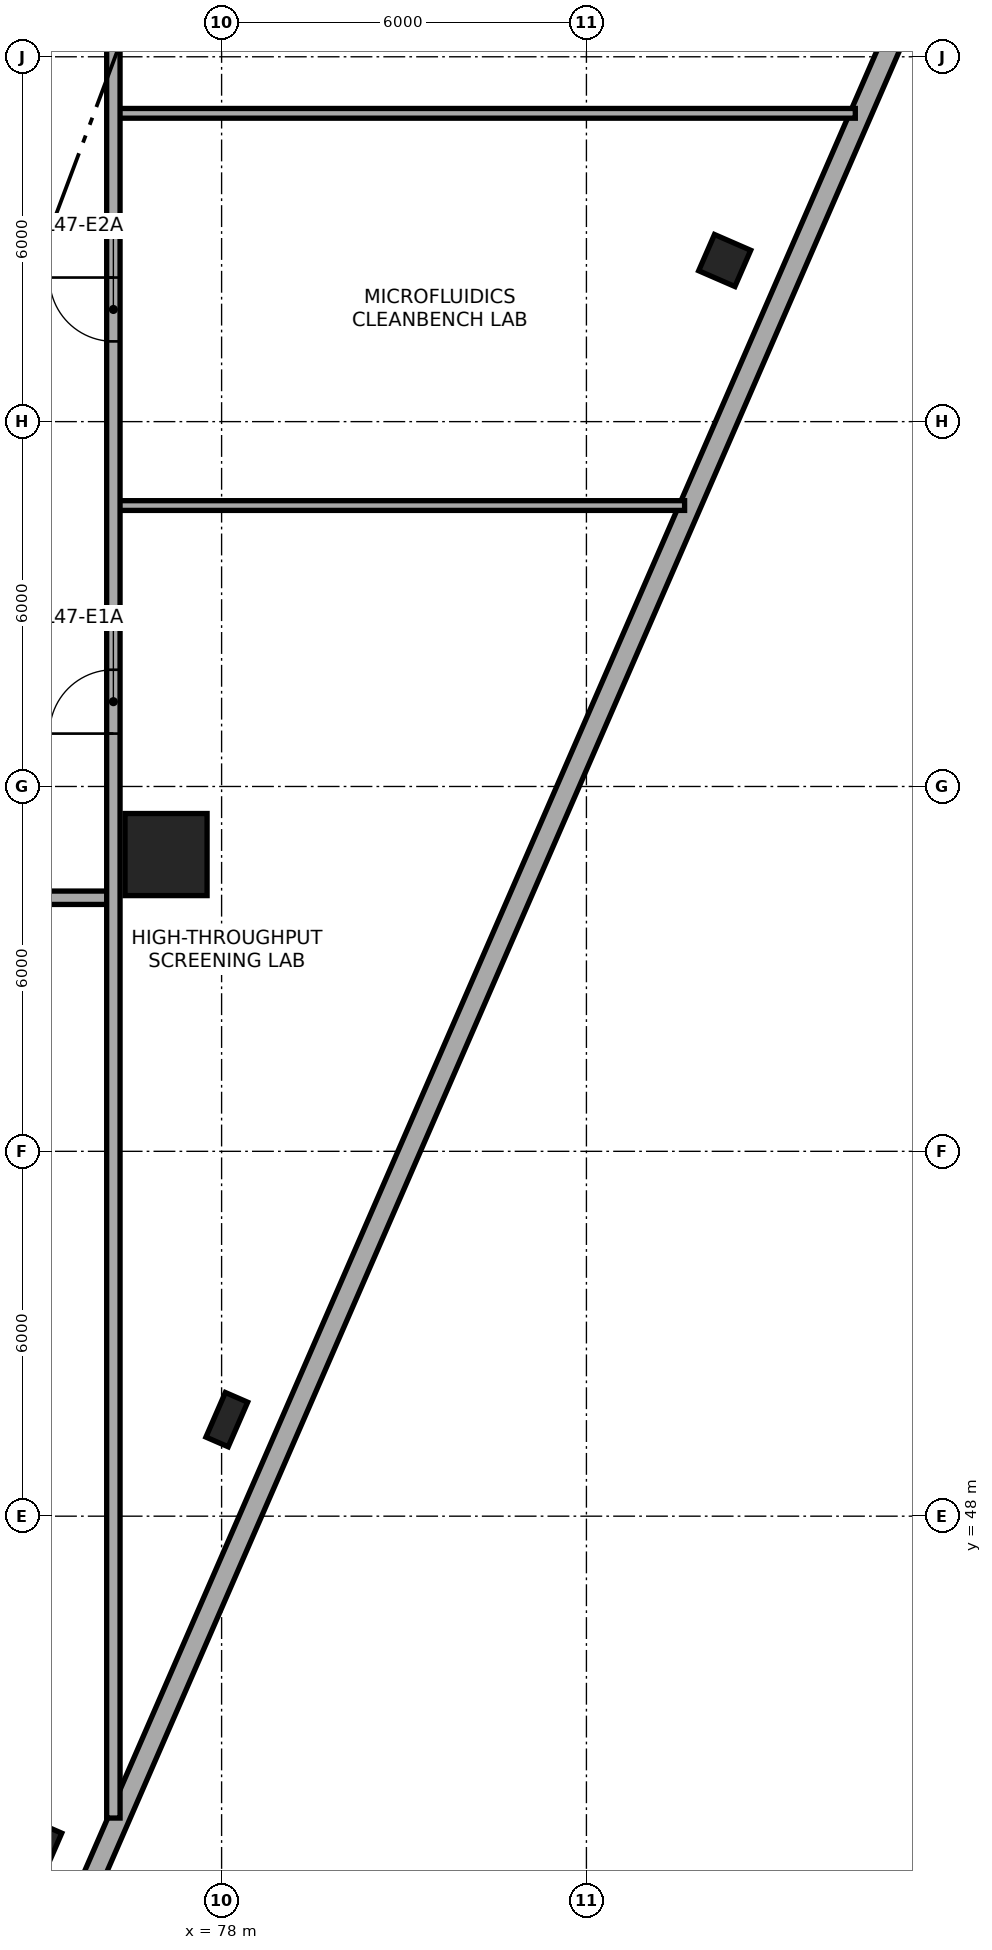
"""IFC4 building model, lengths in metres.
Left out: names, types, materials, properties, quantities, classifications, styles, units other than length and angle.
Written with IfcOpenShell. Run it as: python <this file> out.ifc"""

import sys

from ifc_helpers import new_model, si_unit, direction, frame, frame_2d, origin, origin_2d, place, context, subcontext, project, spatial, rectangle, extrude, element, fill, save


model = new_model("IFC4")
c1 = context("Model", 3, precision=1e-05, world=origin(), true_north=direction((0.0, 1.0)))
c2 = subcontext(c1, "Body", "Model", "MODEL_VIEW")
j1 = project(units=[si_unit("LENGTHUNIT", "METRE"), si_unit("PLANEANGLEUNIT", "RADIAN")], contexts=[c1])
p1 = place(None, origin())
s1 = spatial("IfcSite", under=j1, at=p1, CompositionType="ELEMENT")
p2 = place(p1, origin())
s2 = spatial("IfcBuilding", under=s1, at=p2, CompositionType="ELEMENT")
p3 = place(p2, frame((0.0, 0.0, 179.4)))
s3 = spatial("IfcBuildingStorey", under=s2, at=p3, CompositionType="ELEMENT", Elevation=179.4)
p4 = place(p3, frame((77.086, 58.88, 0.0), z_axis=(0.0, 0.0, 1.0), x_axis=(1.0, 0.0, 0.0)))
e1 = element("IfcColumn", 1, at=p4, inside=s3, PredefinedType="COLUMN", context=c2, shape_type="SweptSolid", body=[
    extrude(rectangle(XDim=1.35, YDim=1.35, at=origin_2d()), origin(), (0.0, 0.0, 1.0), 3.65),
])
p5 = place(p3, frame((74.966, 42.52, 0.003), z_axis=(-0.012442023592, 0.054450576364, 0.998438946948), x_axis=(-0.18521058033, -0.981363560291, 0.051211360722)))
e2 = element("IfcColumn", 2, at=p5, inside=s3, PredefinedType="COLUMN", context=c2, shape_type="SweptSolid", body=[
    extrude(rectangle(XDim=0.65, YDim=0.65, at=origin_2d()), origin(), (0.0, 0.0, 1.0), 3.65),
])
p6 = place(p3, frame((78.121, 49.518, 0.003), z_axis=(-0.019545094565, 0.038286966066, 0.999075621516), x_axis=(0.060973878566, -0.997360875104, 0.039414095746)))
e3 = element("IfcColumn", 3, at=p6, inside=s3, PredefinedType="PILASTER", context=c2, shape_type="SweptSolid", body=[
    extrude(rectangle(XDim=0.8, YDim=0.4, at=origin_2d()), origin(), (0.0, 0.0, 1.0), 3.647),
])
p7 = place(p3, frame((86.346, 68.66, 0.003), z_axis=(-0.039229493406, -0.00569028488, 0.999214024874), x_axis=(0.963969673558, -0.263517553175, 0.036345118363)))
e4 = element("IfcColumn", 4, at=p7, inside=s3, PredefinedType="COLUMN", context=c2, shape_type="SweptSolid", body=[
    extrude(rectangle(XDim=0.65, YDim=0.65, at=origin_2d()), origin(), (0.0, 0.0, 1.0), 3.647),
])
p8 = place(p3, frame((92.464, 80.144, 0.0), z_axis=(0.0, 0.0, 1.0), x_axis=(-0.399091286562, -0.916911197985, 0.0)))
e5 = element("IfcWall", 5, at=p8, inside=s3, PredefinedType="STANDARD", context=c2, shape_type="SweptSolid", body=[
    extrude(rectangle(XDim=54.364, YDim=0.34, at=frame_2d((27.182, 0.0))), origin(), (0.0, 0.0, 1.0), 0.85),
])
p9 = place(p3, frame((49.193, 58.17, 0.0), z_axis=(0.0, 0.0, 1.0), x_axis=(1.0, 0.0, 0.0)))
e6 = element("IfcWall", 6, at=p9, inside=s3, PredefinedType="PARTITIONING", context=c2, shape_type="SweptSolid", body=[
    extrude(rectangle(XDim=27.027, YDim=0.22, at=frame_2d((13.514, 0.0))), origin(), (0.0, 0.0, 1.0), 2.6),
])
p10 = place(p9, frame((12.764, 0.0, 0.0)))
e7 = element("IfcOpeningElement", 7, at=p10, cuts=e6, PredefinedType="OPENING", context=c2, shape_type="SweptSolid", body=[
    extrude(rectangle(XDim=1.5, YDim=2.2, at=frame_2d((0.75, 1.1))), frame((0.0, 0.12, 0.0), z_axis=(0.0, -1.0, 0.0), x_axis=(1.0, 0.0, 0.0)), (0.0, 0.0, 1.0), 0.24),
])
p11 = place(p3, frame((76.22, 64.62, 0.0), z_axis=(0.0, 0.0, 1.0), x_axis=(1.0, 0.0, 0.0)))
e8 = element("IfcWall", 8, at=p11, inside=s3, PredefinedType="PARTITIONING", context=c2, shape_type="SweptSolid", body=[
    extrude(rectangle(XDim=9.395, YDim=0.16, at=frame_2d((4.697, 0.0))), origin(), (0.0, 0.0, 1.0), 2.6),
])
p12 = place(p3, frame((76.22, 71.07, 0.0), z_axis=(0.0, 0.0, 1.0), x_axis=(1.0, 0.0, 0.0)))
e9 = element("IfcWall", 9, at=p12, inside=s3, PredefinedType="PARTITIONING", context=c2, shape_type="SweptSolid", body=[
    extrude(rectangle(XDim=12.202, YDim=0.16, at=frame_2d((6.101, 0.0))), origin(), (0.0, 0.0, 1.0), 2.6),
])
p13 = place(p3, frame((76.22, 43.036, 0.0), z_axis=(0.0, 0.0, 1.0), x_axis=(0.0, 1.0, 0.0)))
e10 = element("IfcWall", 10, at=p13, inside=s3, PredefinedType="PARTITIONING", context=c2, shape_type="SweptSolid", body=[
    extrude(rectangle(XDim=34.484, YDim=0.22, at=frame_2d((17.242, 0.0))), origin(), (0.0, 0.0, 1.0), 2.6),
])
p14 = place(p13, frame((17.834, 0.0, 0.0)))
e11 = element("IfcOpeningElement", 11, at=p14, cuts=e10, PredefinedType="OPENING", context=c2, shape_type="SweptSolid", body=[
    extrude(rectangle(XDim=1.05, YDim=2.15, at=frame_2d((0.525, 1.075))), frame((0.0, 0.12, 0.0), z_axis=(0.0, -1.0, 0.0), x_axis=(1.0, 0.0, 0.0)), (0.0, 0.0, 1.0), 0.24),
])
p15 = place(p13, frame((24.284, 0.0, 0.0)))
e12 = element("IfcOpeningElement", 12, at=p15, cuts=e10, PredefinedType="OPENING", context=c2, shape_type="SweptSolid", body=[
    extrude(rectangle(XDim=1.05, YDim=2.15, at=frame_2d((0.525, 1.075))), frame((0.0, 0.12, 0.0), z_axis=(0.0, -1.0, 0.0), x_axis=(1.0, 0.0, 0.0)), (0.0, 0.0, 1.0), 0.24),
])
p16 = place(p13, frame((30.734, 0.0, 0.0)))
e13 = element("IfcOpeningElement", 13, at=p16, cuts=e10, PredefinedType="OPENING", context=c2, shape_type="SweptSolid", body=[
    extrude(rectangle(XDim=1.05, YDim=2.15, at=frame_2d((0.525, 1.075))), frame((0.0, 0.12, 0.0), z_axis=(0.0, -1.0, 0.0), x_axis=(1.0, 0.0, 0.0)), (0.0, 0.0, 1.0), 0.24),
])
p17 = place(p14, origin())
e14 = element("IfcDoor", 14, at=p17, inside=s3, OperationType="SINGLE_SWING_LEFT", PredefinedType="DOOR", context=c2, shape_type="SweptSolid", body=[
    extrude(rectangle(XDim=1.05, YDim=2.15, at=frame_2d((0.525, 1.075))), frame((0.0, 0.025, 0.0), z_axis=(0.0, -1.0, 0.0), x_axis=(1.0, 0.0, 0.0)), (0.0, 0.0, 1.0), 0.05),
])
fill(e11, e14)
p18 = place(p15, origin())
e15 = element("IfcDoor", 15, at=p18, inside=s3, OperationType="SINGLE_SWING_RIGHT", PredefinedType="DOOR", context=c2, shape_type="SweptSolid", body=[
    extrude(rectangle(XDim=1.05, YDim=2.15, at=frame_2d((0.525, 1.075))), frame((0.0, 0.025, 0.0), z_axis=(0.0, -1.0, 0.0), x_axis=(1.0, 0.0, 0.0)), (0.0, 0.0, 1.0), 0.05),
])
fill(e12, e15)
save(model, sys.argv[1])
